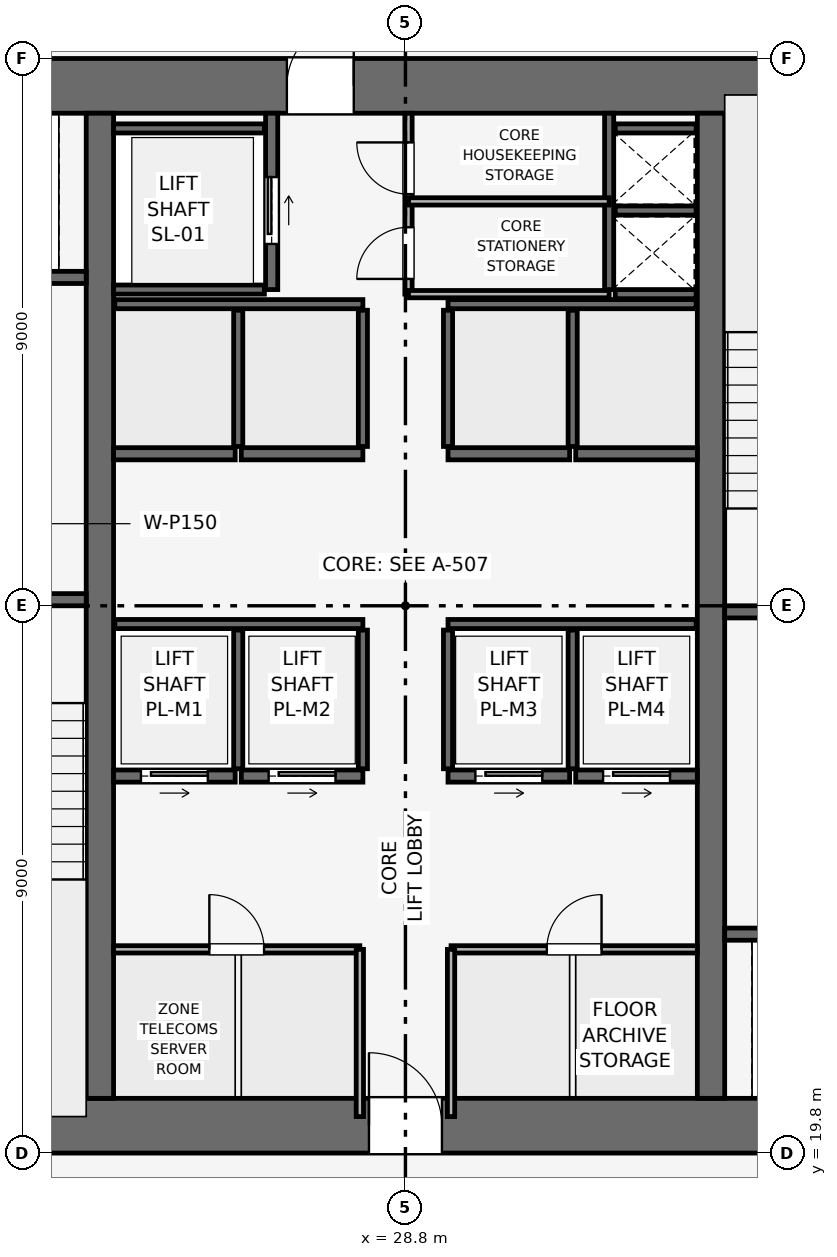
"""IFC4 building model, lengths in metres.
Left out: names, types, materials, properties, quantities, classifications, styles, units other than length and angle.
Written with IfcOpenShell. Run it as: python <this file> out.ifc"""

import sys

from ifc_helpers import new_model, si_unit, direction, frame, frame_2d, origin, place, context, subcontext, project, spatial, rectangle, extrude, element, fill, save


model = new_model("IFC4")
c1 = context("Model", 3, precision=1e-05, world=origin(), true_north=direction((0.0, 1.0)))
c2 = subcontext(c1, "Body", "Model", "MODEL_VIEW")
j1 = project(units=[si_unit("LENGTHUNIT", "METRE"), si_unit("PLANEANGLEUNIT", "RADIAN")], contexts=[c1])
p1 = place(None, origin())
s1 = spatial("IfcSite", under=j1, at=p1, CompositionType="ELEMENT")
p2 = place(p1, origin())
s2 = spatial("IfcBuilding", under=s1, at=p2, CompositionType="ELEMENT")
p3 = place(p2, frame((0.0, 0.0, 164.55)))
s3 = spatial("IfcBuildingStorey", under=s2, at=p3, CompositionType="ELEMENT", Elevation=164.55)
p4 = place(p3, frame((19.8, 20.25, 0.0), z_axis=(0.0, 0.0, 1.0), x_axis=(1.0, 0.0, 0.0)))
e1 = element("IfcWall", 1, at=p4, inside=s3, PredefinedType="SHEAR", context=c2, shape_type="SweptSolid", body=[
    extrude(rectangle(XDim=18.0, YDim=0.9, at=frame_2d((9.0, 0.0))), origin(), (0.0, 0.0, 1.0), 3.75),
])
p5 = place(p4, frame((8.4, 0.0, 0.0)))
e2 = element("IfcOpeningElement", 2, at=p5, cuts=e1, PredefinedType="OPENING", context=c2, shape_type="SweptSolid", body=[
    extrude(rectangle(XDim=1.2, YDim=2.2, at=frame_2d((0.6, 1.1))), frame((0.0, 0.46, 0.0), z_axis=(0.0, -1.0, 0.0), x_axis=(1.0, 0.0, 0.0)), (0.0, 0.0, 1.0), 0.92),
])
p6 = place(p3, frame((19.8, 37.35, 0.0), z_axis=(0.0, 0.0, 1.0), x_axis=(1.0, 0.0, 0.0)))
e3 = element("IfcWall", 3, at=p6, inside=s3, PredefinedType="SHEAR", context=c2, shape_type="SweptSolid", body=[
    extrude(rectangle(XDim=18.0, YDim=0.9, at=frame_2d((9.0, 0.0))), origin(), (0.0, 0.0, 1.0), 3.75),
])
p7 = place(p6, frame((7.05, 0.0, 0.0)))
e4 = element("IfcOpeningElement", 4, at=p7, cuts=e3, PredefinedType="OPENING", context=c2, shape_type="SweptSolid", body=[
    extrude(rectangle(XDim=1.1, YDim=2.15, at=frame_2d((0.55, 1.075))), frame((0.0, 0.46, 0.0), z_axis=(0.0, -1.0, 0.0), x_axis=(1.0, 0.0, 0.0)), (0.0, 0.0, 1.0), 0.92),
])
for number, where, z_axis, x_axis in (
    (5, (23.775, 20.7, 0.0), (0.0, 0.0, 1.0), (0.0, 1.0, 0.0)),
    (6, (33.825, 20.7, 0.0), (0.0, 0.0, 1.0), (0.0, 1.0, 0.0)),
):
    element("IfcWall", number, at=place(p3, frame(where, z_axis=z_axis, x_axis=x_axis)), inside=s3, PredefinedType="SHEAR", context=c2, shape_type="SweptSolid", body=[
        extrude(rectangle(XDim=16.2, YDim=0.45, at=frame_2d((8.1, 0.0))), origin(), (0.0, 0.0, 1.0), 3.75),
    ])
p8 = place(p3, frame((20.4, 28.9, 0.0), z_axis=(0.0, 0.0, 1.0), x_axis=(1.0, 0.0, 0.0)))
e7 = element("IfcWall", 7, at=p8, inside=s3, PredefinedType="SHEAR", context=c2, shape_type="SweptSolid", body=[
    extrude(rectangle(XDim=3.15, YDim=0.2, at=frame_2d((1.575, 0.0))), origin(), (0.0, 0.0, 1.0), 3.495),
])
p9 = place(p8, frame((0.8, 0.0, 0.0)))
e8 = element("IfcOpeningElement", 8, at=p9, cuts=e7, PredefinedType="OPENING", context=c2, shape_type="SweptSolid", body=[
    extrude(rectangle(XDim=1.0, YDim=2.1, at=frame_2d((0.5, 1.05))), frame((0.0, 0.11, 0.0), z_axis=(0.0, -1.0, 0.0), x_axis=(1.0, 0.0, 0.0)), (0.0, 0.0, 1.0), 0.22),
])
p10 = place(p3, frame((34.05, 28.7, 0.0), z_axis=(0.0, 0.0, 1.0), x_axis=(1.0, 0.0, 0.0)))
e9 = element("IfcWall", 9, at=p10, inside=s3, PredefinedType="SHEAR", context=c2, shape_type="SweptSolid", body=[
    extrude(rectangle(XDim=3.15, YDim=0.2, at=frame_2d((1.575, 0.0))), origin(), (0.0, 0.0, 1.0), 3.495),
])
p11 = place(p10, frame((0.8, 0.0, 0.0)))
e10 = element("IfcOpeningElement", 10, at=p11, cuts=e9, PredefinedType="OPENING", context=c2, shape_type="SweptSolid", body=[
    extrude(rectangle(XDim=1.0, YDim=2.1, at=frame_2d((0.5, 1.05))), frame((0.0, 0.11, 0.0), z_axis=(0.0, -1.0, 0.0), x_axis=(1.0, 0.0, 0.0)), (0.0, 0.0, 1.0), 0.22),
])
p12 = place(p3, frame((32.15, 34.0, 0.0), z_axis=(0.0, 0.0, 1.0), x_axis=(0.0, 1.0, 0.0)))
e11 = element("IfcWall", 11, at=p12, inside=s3, PredefinedType="SHEAR", context=c2, shape_type="SweptSolid", body=[
    extrude(rectangle(XDim=2.9, YDim=0.15, at=frame_2d((1.45, 0.0))), origin(), (0.0, 0.0, 1.0), 3.495),
])
for number, where, z_axis, x_axis in (
    (12, (32.25, 33.925, 0.0), (0.0, 0.0, 1.0), (1.0, 0.0, 0.0)),
    (13, (32.25, 35.3, 0.0), (0.0, 0.0, 1.0), (1.0, 0.0, 0.0)),
):
    element("IfcWall", number, at=place(p3, frame(where, z_axis=z_axis, x_axis=x_axis)), inside=s3, PredefinedType="SHEAR", context=c2, shape_type="SweptSolid", body=[
        extrude(rectangle(XDim=1.33, YDim=0.15, at=frame_2d((0.665, 0.0))), origin(), (0.0, 0.0, 1.0), 3.495),
    ])
p13 = place(p3, frame((20.5, 34.2, 0.0), z_axis=(0.0, 0.0, 1.0), x_axis=(1.0, 0.0, 0.0)))
e14 = element("IfcWall", 14, at=p13, inside=s3, PredefinedType="SHEAR", context=c2, shape_type="SweptSolid", body=[
    extrude(rectangle(XDim=3.05, YDim=0.2, at=frame_2d((1.525, 0.0))), origin(), (0.0, 0.0, 1.0), 3.495),
])
p14 = place(p13, frame((0.75, 0.0, 0.0)))
e15 = element("IfcOpeningElement", 15, at=p14, cuts=e14, PredefinedType="OPENING", context=c2, shape_type="SweptSolid", body=[
    extrude(rectangle(XDim=1.1, YDim=2.15, at=frame_2d((0.55, 1.075))), frame((0.0, 0.11, 0.0), z_axis=(0.0, -1.0, 0.0), x_axis=(1.0, 0.0, 0.0)), (0.0, 0.0, 1.0), 0.22),
])
p15 = place(p3, frame((34.05, 23.4, 0.0), z_axis=(0.0, 0.0, 1.0), x_axis=(1.0, 0.0, 0.0)))
e16 = element("IfcWall", 16, at=p15, inside=s3, PredefinedType="SHEAR", context=c2, shape_type="SweptSolid", body=[
    extrude(rectangle(XDim=3.05, YDim=0.2, at=frame_2d((1.525, 0.0))), origin(), (0.0, 0.0, 1.0), 3.495),
])
p16 = place(p15, frame((1.2, 0.0, 0.0)))
e17 = element("IfcOpeningElement", 17, at=p16, cuts=e16, PredefinedType="OPENING", context=c2, shape_type="SweptSolid", body=[
    extrude(rectangle(XDim=1.1, YDim=2.15, at=frame_2d((0.55, 1.075))), frame((0.0, 0.11, 0.0), z_axis=(0.0, -1.0, 0.0), x_axis=(1.0, 0.0, 0.0)), (0.0, 0.0, 1.0), 0.22),
])
p17 = place(p3, frame((26.6, 34.0, 0.0), z_axis=(0.0, 0.0, 1.0), x_axis=(0.0, 1.0, 0.0)))
e18 = element("IfcWall", 18, at=p17, inside=s3, PredefinedType="SHEAR", context=c2, shape_type="SweptSolid", body=[
    extrude(rectangle(XDim=2.9, YDim=0.2, at=frame_2d((1.45, 0.0))), origin(), (0.0, 0.0, 1.0), 3.495),
])
p18 = place(p17, frame((0.75, 0.0, 0.0)))
e19 = element("IfcOpeningElement", 19, at=p18, cuts=e18, PredefinedType="OPENING", context=c2, shape_type="SweptSolid", body=[
    extrude(rectangle(XDim=1.1, YDim=2.15, at=frame_2d((0.55, 1.075))), frame((0.0, 0.11, 0.0), z_axis=(0.0, -1.0, 0.0), x_axis=(1.0, 0.0, 0.0)), (0.0, 0.0, 1.0), 0.22),
])
for number, where, z_axis, x_axis in (
    (20, (24.0, 34.0, 0.0), (0.0, 0.0, 1.0), (1.0, 0.0, 0.0)),
    (21, (24.0, 36.65, 0.0), (0.0, 0.0, 1.0), (1.0, 0.0, 0.0)),
):
    element("IfcWall", number, at=place(p3, frame(where, z_axis=z_axis, x_axis=x_axis)), inside=s3, PredefinedType="SHEAR", context=c2, shape_type="SweptSolid", body=[
        extrude(rectangle(XDim=2.48, YDim=0.15, at=frame_2d((1.24, 0.0))), origin(), (0.0, 0.0, 1.0), 3.495),
    ])
p19 = place(p3, frame((24.0, 26.0, 0.0), z_axis=(0.0, 0.0, 1.0), x_axis=(1.0, 0.0, 0.0)))
e22 = element("IfcWall", 22, at=p19, inside=s3, PredefinedType="SHEAR", context=c2, shape_type="SweptSolid", body=[
    extrude(rectangle(XDim=2.0, YDim=0.2, at=frame_2d((1.0, 0.0))), origin(), (0.0, 0.0, 1.0), 3.495),
])
p20 = place(p19, frame((0.45, 0.0, 0.0)))
e23 = element("IfcOpeningElement", 23, at=p20, cuts=e22, PredefinedType="OPENING", context=c2, shape_type="SweptSolid", body=[
    extrude(rectangle(XDim=1.1, YDim=2.15, at=frame_2d((0.55, 1.075))), frame((0.0, 0.11, 0.0), z_axis=(0.0, -1.0, 0.0), x_axis=(1.0, 0.0, 0.0)), (0.0, 0.0, 1.0), 0.22),
])
p21 = place(p3, frame((26.1, 26.0, 0.0), z_axis=(0.0, 0.0, 1.0), x_axis=(1.0, 0.0, 0.0)))
e24 = element("IfcWall", 24, at=p21, inside=s3, PredefinedType="SHEAR", context=c2, shape_type="SweptSolid", body=[
    extrude(rectangle(XDim=2.0, YDim=0.2, at=frame_2d((1.0, 0.0))), origin(), (0.0, 0.0, 1.0), 3.495),
])
p22 = place(p21, frame((0.45, 0.0, 0.0)))
e25 = element("IfcOpeningElement", 25, at=p22, cuts=e24, PredefinedType="OPENING", context=c2, shape_type="SweptSolid", body=[
    extrude(rectangle(XDim=1.1, YDim=2.15, at=frame_2d((0.55, 1.075))), frame((0.0, 0.11, 0.0), z_axis=(0.0, -1.0, 0.0), x_axis=(1.0, 0.0, 0.0)), (0.0, 0.0, 1.0), 0.22),
])
p23 = place(p3, frame((29.5, 26.0, 0.0), z_axis=(0.0, 0.0, 1.0), x_axis=(1.0, 0.0, 0.0)))
e26 = element("IfcWall", 26, at=p23, inside=s3, PredefinedType="SHEAR", context=c2, shape_type="SweptSolid", body=[
    extrude(rectangle(XDim=2.0, YDim=0.2, at=frame_2d((1.0, 0.0))), origin(), (0.0, 0.0, 1.0), 3.495),
])
p24 = place(p23, frame((0.45, 0.0, 0.0)))
e27 = element("IfcOpeningElement", 27, at=p24, cuts=e26, PredefinedType="OPENING", context=c2, shape_type="SweptSolid", body=[
    extrude(rectangle(XDim=1.1, YDim=2.15, at=frame_2d((0.55, 1.075))), frame((0.0, 0.11, 0.0), z_axis=(0.0, -1.0, 0.0), x_axis=(1.0, 0.0, 0.0)), (0.0, 0.0, 1.0), 0.22),
])
p25 = place(p3, frame((31.6, 26.0, 0.0), z_axis=(0.0, 0.0, 1.0), x_axis=(1.0, 0.0, 0.0)))
e28 = element("IfcWall", 28, at=p25, inside=s3, PredefinedType="SHEAR", context=c2, shape_type="SweptSolid", body=[
    extrude(rectangle(XDim=2.0, YDim=0.2, at=frame_2d((1.0, 0.0))), origin(), (0.0, 0.0, 1.0), 3.495),
])
p26 = place(p25, frame((0.45, 0.0, 0.0)))
e29 = element("IfcOpeningElement", 29, at=p26, cuts=e28, PredefinedType="OPENING", context=c2, shape_type="SweptSolid", body=[
    extrude(rectangle(XDim=1.1, YDim=2.15, at=frame_2d((0.55, 1.075))), frame((0.0, 0.11, 0.0), z_axis=(0.0, -1.0, 0.0), x_axis=(1.0, 0.0, 0.0)), (0.0, 0.0, 1.0), 0.22),
])
for number, where, z_axis, x_axis in (
    (30, (24.0, 31.3, 0.0), (0.0, 0.0, 1.0), (1.0, 0.0, 0.0)),
    (31, (26.1, 31.3, 0.0), (0.0, 0.0, 1.0), (1.0, 0.0, 0.0)),
    (32, (29.5, 31.3, 0.0), (0.0, 0.0, 1.0), (1.0, 0.0, 0.0)),
    (33, (31.6, 31.3, 0.0), (0.0, 0.0, 1.0), (1.0, 0.0, 0.0)),
):
    element("IfcWall", number, at=place(p3, frame(where, z_axis=z_axis, x_axis=x_axis)), inside=s3, PredefinedType="SHEAR", context=c2, shape_type="SweptSolid", body=[
        extrude(rectangle(XDim=2.0, YDim=0.2, at=frame_2d((1.0, 0.0))), origin(), (0.0, 0.0, 1.0), 3.495),
    ])
p27 = place(p3, frame((32.25, 36.65, 0.0), z_axis=(0.0, 0.0, 1.0), x_axis=(1.0, 0.0, 0.0)))
e34 = element("IfcWall", 34, at=p27, inside=s3, PredefinedType="SHEAR", context=c2, shape_type="SweptSolid", body=[
    extrude(rectangle(XDim=1.33, YDim=0.15, at=frame_2d((0.665, 0.0))), origin(), (0.0, 0.0, 1.0), 3.495),
])
for number, where, z_axis, x_axis in (
    (35, (24.02, 28.5, 0.0), (0.0, 0.0, 1.0), (1.0, 0.0, 0.0)),
    (36, (29.5, 28.5, 0.0), (0.0, 0.0, 1.0), (1.0, 0.0, 0.0)),
):
    element("IfcWall", number, at=place(p3, frame(where, z_axis=z_axis, x_axis=x_axis)), inside=s3, PredefinedType="SHEAR", context=c2, shape_type="SweptSolid", body=[
        extrude(rectangle(XDim=4.08, YDim=0.15, at=frame_2d((2.04, 0.0))), origin(), (0.0, 0.0, 1.0), 3.495),
    ])
for number, where, z_axis, x_axis in (
    (37, (26.05, 26.12, 0.0), (0.0, 0.0, 1.0), (0.0, 1.0, 0.0)),
    (38, (28.1, 26.12, 0.0), (0.0, 0.0, 1.0), (0.0, 1.0, 0.0)),
    (39, (29.5, 26.12, 0.0), (0.0, 0.0, 1.0), (0.0, 1.0, 0.0)),
    (40, (31.55, 26.12, 0.0), (0.0, 0.0, 1.0), (0.0, 1.0, 0.0)),
):
    element("IfcWall", number, at=place(p3, frame(where, z_axis=z_axis, x_axis=x_axis)), inside=s3, PredefinedType="SHEAR", context=c2, shape_type="SweptSolid", body=[
        extrude(rectangle(XDim=2.28, YDim=0.15, at=frame_2d((1.14, 0.0))), origin(), (0.0, 0.0, 1.0), 3.495),
    ])
for number, where, z_axis, x_axis in (
    (41, (24.02, 33.76, 0.0), (0.0, 0.0, 1.0), (1.0, 0.0, 0.0)),
    (42, (29.5, 33.76, 0.0), (0.0, 0.0, 1.0), (1.0, 0.0, 0.0)),
):
    element("IfcWall", number, at=place(p3, frame(where, z_axis=z_axis, x_axis=x_axis)), inside=s3, PredefinedType="SHEAR", context=c2, shape_type="SweptSolid", body=[
        extrude(rectangle(XDim=4.08, YDim=0.15, at=frame_2d((2.04, 0.0))), origin(), (0.0, 0.0, 1.0), 3.495),
    ])
for number, where, z_axis, x_axis in (
    (43, (26.05, 31.42, 0.0), (0.0, 0.0, 1.0), (0.0, 1.0, 0.0)),
    (44, (28.1, 31.42, 0.0), (0.0, 0.0, 1.0), (0.0, 1.0, 0.0)),
    (45, (29.5, 31.42, 0.0), (0.0, 0.0, 1.0), (0.0, 1.0, 0.0)),
    (46, (31.55, 31.42, 0.0), (0.0, 0.0, 1.0), (0.0, 1.0, 0.0)),
):
    element("IfcWall", number, at=place(p3, frame(where, z_axis=z_axis, x_axis=x_axis)), inside=s3, PredefinedType="SHEAR", context=c2, shape_type="SweptSolid", body=[
        extrude(rectangle(XDim=2.24, YDim=0.15, at=frame_2d((1.12, 0.0))), origin(), (0.0, 0.0, 1.0), 3.495),
    ])
p28 = place(p3, frame((28.85, 33.925, 0.0), z_axis=(0.0, 0.0, 1.0), x_axis=(0.0, 1.0, 0.0)))
e47 = element("IfcWall", 47, at=p28, inside=s3, PredefinedType="PARTITIONING", context=c2, shape_type="SweptSolid", body=[
    extrude(rectangle(XDim=2.975, YDim=0.12, at=frame_2d((1.487, 0.0))), origin(), (0.0, 0.0, 1.0), 3.495),
])
p29 = place(p28, frame((0.25, 0.0, 0.0)))
e48 = element("IfcOpeningElement", 48, at=p29, cuts=e47, PredefinedType="OPENING", context=c2, shape_type="SweptSolid", body=[
    extrude(rectangle(XDim=0.85, YDim=2.1, at=frame_2d((0.425, 1.05))), frame((0.0, 0.07, 0.0), z_axis=(0.0, -1.0, 0.0), x_axis=(1.0, 0.0, 0.0)), (0.0, 0.0, 1.0), 0.14),
])
p30 = place(p28, frame((1.645, 0.0, 0.0)))
e49 = element("IfcOpeningElement", 49, at=p30, cuts=e47, PredefinedType="OPENING", context=c2, shape_type="SweptSolid", body=[
    extrude(rectangle(XDim=0.85, YDim=2.1, at=frame_2d((0.425, 1.05))), frame((0.0, 0.07, 0.0), z_axis=(0.0, -1.0, 0.0), x_axis=(1.0, 0.0, 0.0)), (0.0, 0.0, 1.0), 0.14),
])
for number, where, z_axis, x_axis in (
    (50, (28.85, 35.45, 0.0), (0.0, 0.0, 1.0), (1.0, 0.0, 0.0)),
    (51, (28.85, 33.925, 0.0), (0.0, 0.0, 1.0), (1.0, 0.0, 0.0)),
):
    element("IfcWall", number, at=place(p3, frame(where, z_axis=z_axis, x_axis=x_axis)), inside=s3, PredefinedType="PARTITIONING", context=c2, shape_type="SweptSolid", body=[
        extrude(rectangle(XDim=3.3, YDim=0.12, at=frame_2d((1.65, 0.0))), origin(), (0.0, 0.0, 1.0), 3.495),
    ])
p31 = place(p3, frame((24.0, 23.15, 0.0), z_axis=(0.0, 0.0, 1.0), x_axis=(1.0, 0.0, 0.0)))
e52 = element("IfcWall", 52, at=p31, inside=s3, PredefinedType="PARTITIONING", context=c2, shape_type="SweptSolid", body=[
    extrude(rectangle(XDim=4.05, YDim=0.12, at=frame_2d((2.025, 0.0))), origin(), (0.0, 0.0, 1.0), 3.495),
])
p32 = place(p31, frame((1.575, 0.0, 0.0)))
e53 = element("IfcOpeningElement", 53, at=p32, cuts=e52, PredefinedType="OPENING", context=c2, shape_type="SweptSolid", body=[
    extrude(rectangle(XDim=0.9, YDim=2.1, at=frame_2d((0.45, 1.05))), frame((0.0, 0.07, 0.0), z_axis=(0.0, -1.0, 0.0), x_axis=(1.0, 0.0, 0.0)), (0.0, 0.0, 1.0), 0.14),
])
p33 = place(p3, frame((28.05, 20.4, 0.0), z_axis=(0.0, 0.0, 1.0), x_axis=(0.0, 1.0, 0.0)))
e54 = element("IfcWall", 54, at=p33, inside=s3, PredefinedType="PARTITIONING", context=c2, shape_type="SweptSolid", body=[
    extrude(rectangle(XDim=2.75, YDim=0.12, at=frame_2d((1.375, 0.0))), origin(), (0.0, 0.0, 1.0), 3.495),
])
p34 = place(p3, frame((29.55, 23.15, 0.0), z_axis=(0.0, 0.0, 1.0), x_axis=(1.0, 0.0, 0.0)))
e55 = element("IfcWall", 55, at=p34, inside=s3, PredefinedType="PARTITIONING", context=c2, shape_type="SweptSolid", body=[
    extrude(rectangle(XDim=4.05, YDim=0.12, at=frame_2d((2.025, 0.0))), origin(), (0.0, 0.0, 1.0), 3.495),
])
p35 = place(p34, frame((1.575, 0.0, 0.0)))
e56 = element("IfcOpeningElement", 56, at=p35, cuts=e55, PredefinedType="OPENING", context=c2, shape_type="SweptSolid", body=[
    extrude(rectangle(XDim=0.9, YDim=2.1, at=frame_2d((0.45, 1.05))), frame((0.0, 0.07, 0.0), z_axis=(0.0, -1.0, 0.0), x_axis=(1.0, 0.0, 0.0)), (0.0, 0.0, 1.0), 0.14),
])
p36 = place(p3, frame((29.55, 20.4, 0.0), z_axis=(0.0, 0.0, 1.0), x_axis=(0.0, 1.0, 0.0)))
e57 = element("IfcWall", 57, at=p36, inside=s3, PredefinedType="PARTITIONING", context=c2, shape_type="SweptSolid", body=[
    extrude(rectangle(XDim=2.75, YDim=0.12, at=frame_2d((1.375, 0.0))), origin(), (0.0, 0.0, 1.0), 3.495),
])
p37 = place(p18, origin())
e58 = element("IfcDoor", 58, at=p37, inside=s3, OperationType="SLIDING_TO_RIGHT", PredefinedType="DOOR", context=c2, shape_type="SweptSolid", body=[
    extrude(rectangle(XDim=1.1, YDim=2.15, at=frame_2d((0.55, 1.075))), frame((0.0, 0.025, 0.0), z_axis=(0.0, -1.0, 0.0), x_axis=(1.0, 0.0, 0.0)), (0.0, 0.0, 1.0), 0.05),
])
fill(e19, e58)
p38 = place(p20, origin())
e59 = element("IfcDoor", 59, at=p38, inside=s3, OperationType="SLIDING_TO_RIGHT", PredefinedType="DOOR", context=c2, shape_type="SweptSolid", body=[
    extrude(rectangle(XDim=1.1, YDim=2.15, at=frame_2d((0.55, 1.075))), frame((0.0, 0.025, 0.0), z_axis=(0.0, -1.0, 0.0), x_axis=(1.0, 0.0, 0.0)), (0.0, 0.0, 1.0), 0.05),
])
fill(e23, e59)
p39 = place(p22, origin())
e60 = element("IfcDoor", 60, at=p39, inside=s3, OperationType="SLIDING_TO_RIGHT", PredefinedType="DOOR", context=c2, shape_type="SweptSolid", body=[
    extrude(rectangle(XDim=1.1, YDim=2.15, at=frame_2d((0.55, 1.075))), frame((0.0, 0.025, 0.0), z_axis=(0.0, -1.0, 0.0), x_axis=(1.0, 0.0, 0.0)), (0.0, 0.0, 1.0), 0.05),
])
fill(e25, e60)
p40 = place(p24, origin())
e61 = element("IfcDoor", 61, at=p40, inside=s3, OperationType="SLIDING_TO_RIGHT", PredefinedType="DOOR", context=c2, shape_type="SweptSolid", body=[
    extrude(rectangle(XDim=1.1, YDim=2.15, at=frame_2d((0.55, 1.075))), frame((0.0, 0.025, 0.0), z_axis=(0.0, -1.0, 0.0), x_axis=(1.0, 0.0, 0.0)), (0.0, 0.0, 1.0), 0.05),
])
fill(e27, e61)
p41 = place(p26, origin())
e62 = element("IfcDoor", 62, at=p41, inside=s3, OperationType="SLIDING_TO_RIGHT", PredefinedType="DOOR", context=c2, shape_type="SweptSolid", body=[
    extrude(rectangle(XDim=1.1, YDim=2.15, at=frame_2d((0.55, 1.075))), frame((0.0, 0.025, 0.0), z_axis=(0.0, -1.0, 0.0), x_axis=(1.0, 0.0, 0.0)), (0.0, 0.0, 1.0), 0.05),
])
fill(e29, e62)
p42 = place(p29, origin())
e63 = element("IfcDoor", 63, at=p42, inside=s3, OperationType="SINGLE_SWING_LEFT", PredefinedType="DOOR", context=c2, shape_type="SweptSolid", body=[
    extrude(rectangle(XDim=0.85, YDim=2.1, at=frame_2d((0.425, 1.05))), frame((0.0, 0.025, 0.0), z_axis=(0.0, -1.0, 0.0), x_axis=(1.0, 0.0, 0.0)), (0.0, 0.0, 1.0), 0.05),
])
fill(e48, e63)
p43 = place(p30, origin())
e64 = element("IfcDoor", 64, at=p43, inside=s3, OperationType="SINGLE_SWING_RIGHT", PredefinedType="DOOR", context=c2, shape_type="SweptSolid", body=[
    extrude(rectangle(XDim=0.85, YDim=2.1, at=frame_2d((0.425, 1.05))), frame((0.0, 0.025, 0.0), z_axis=(0.0, -1.0, 0.0), x_axis=(1.0, 0.0, 0.0)), (0.0, 0.0, 1.0), 0.05),
])
fill(e49, e64)
p44 = place(p32, origin())
e65 = element("IfcDoor", 65, at=p44, inside=s3, OperationType="SINGLE_SWING_LEFT", PredefinedType="DOOR", context=c2, shape_type="SweptSolid", body=[
    extrude(rectangle(XDim=0.9, YDim=2.1, at=frame_2d((0.45, 1.05))), frame((0.0, 0.025, 0.0), z_axis=(0.0, -1.0, 0.0), x_axis=(1.0, 0.0, 0.0)), (0.0, 0.0, 1.0), 0.05),
])
fill(e53, e65)
p45 = place(p35, origin())
e66 = element("IfcDoor", 66, at=p45, inside=s3, OperationType="SINGLE_SWING_RIGHT", PredefinedType="DOOR", context=c2, shape_type="SweptSolid", body=[
    extrude(rectangle(XDim=0.9, YDim=2.1, at=frame_2d((0.45, 1.05))), frame((0.0, 0.025, 0.0), z_axis=(0.0, -1.0, 0.0), x_axis=(1.0, 0.0, 0.0)), (0.0, 0.0, 1.0), 0.05),
])
fill(e56, e66)
p46 = place(p5, origin())
e67 = element("IfcDoor", 67, at=p46, inside=s3, OperationType="SINGLE_SWING_LEFT", PredefinedType="DOOR", context=c2, shape_type="SweptSolid", body=[
    extrude(rectangle(XDim=1.2, YDim=2.2, at=frame_2d((0.6, 1.1))), frame((0.0, 0.025, 0.0), z_axis=(0.0, -1.0, 0.0), x_axis=(1.0, 0.0, 0.0)), (0.0, 0.0, 1.0), 0.05),
])
fill(e2, e67)
p47 = place(p7, origin())
e68 = element("IfcDoor", 68, at=p47, inside=s3, OperationType="SINGLE_SWING_RIGHT", PredefinedType="DOOR", context=c2, shape_type="SweptSolid", body=[
    extrude(rectangle(XDim=1.1, YDim=2.15, at=frame_2d((0.55, 1.075))), frame((0.0, 0.025, 0.0), z_axis=(0.0, -1.0, 0.0), x_axis=(1.0, 0.0, 0.0)), (0.0, 0.0, 1.0), 0.05),
])
fill(e4, e68)
save(model, sys.argv[1])
